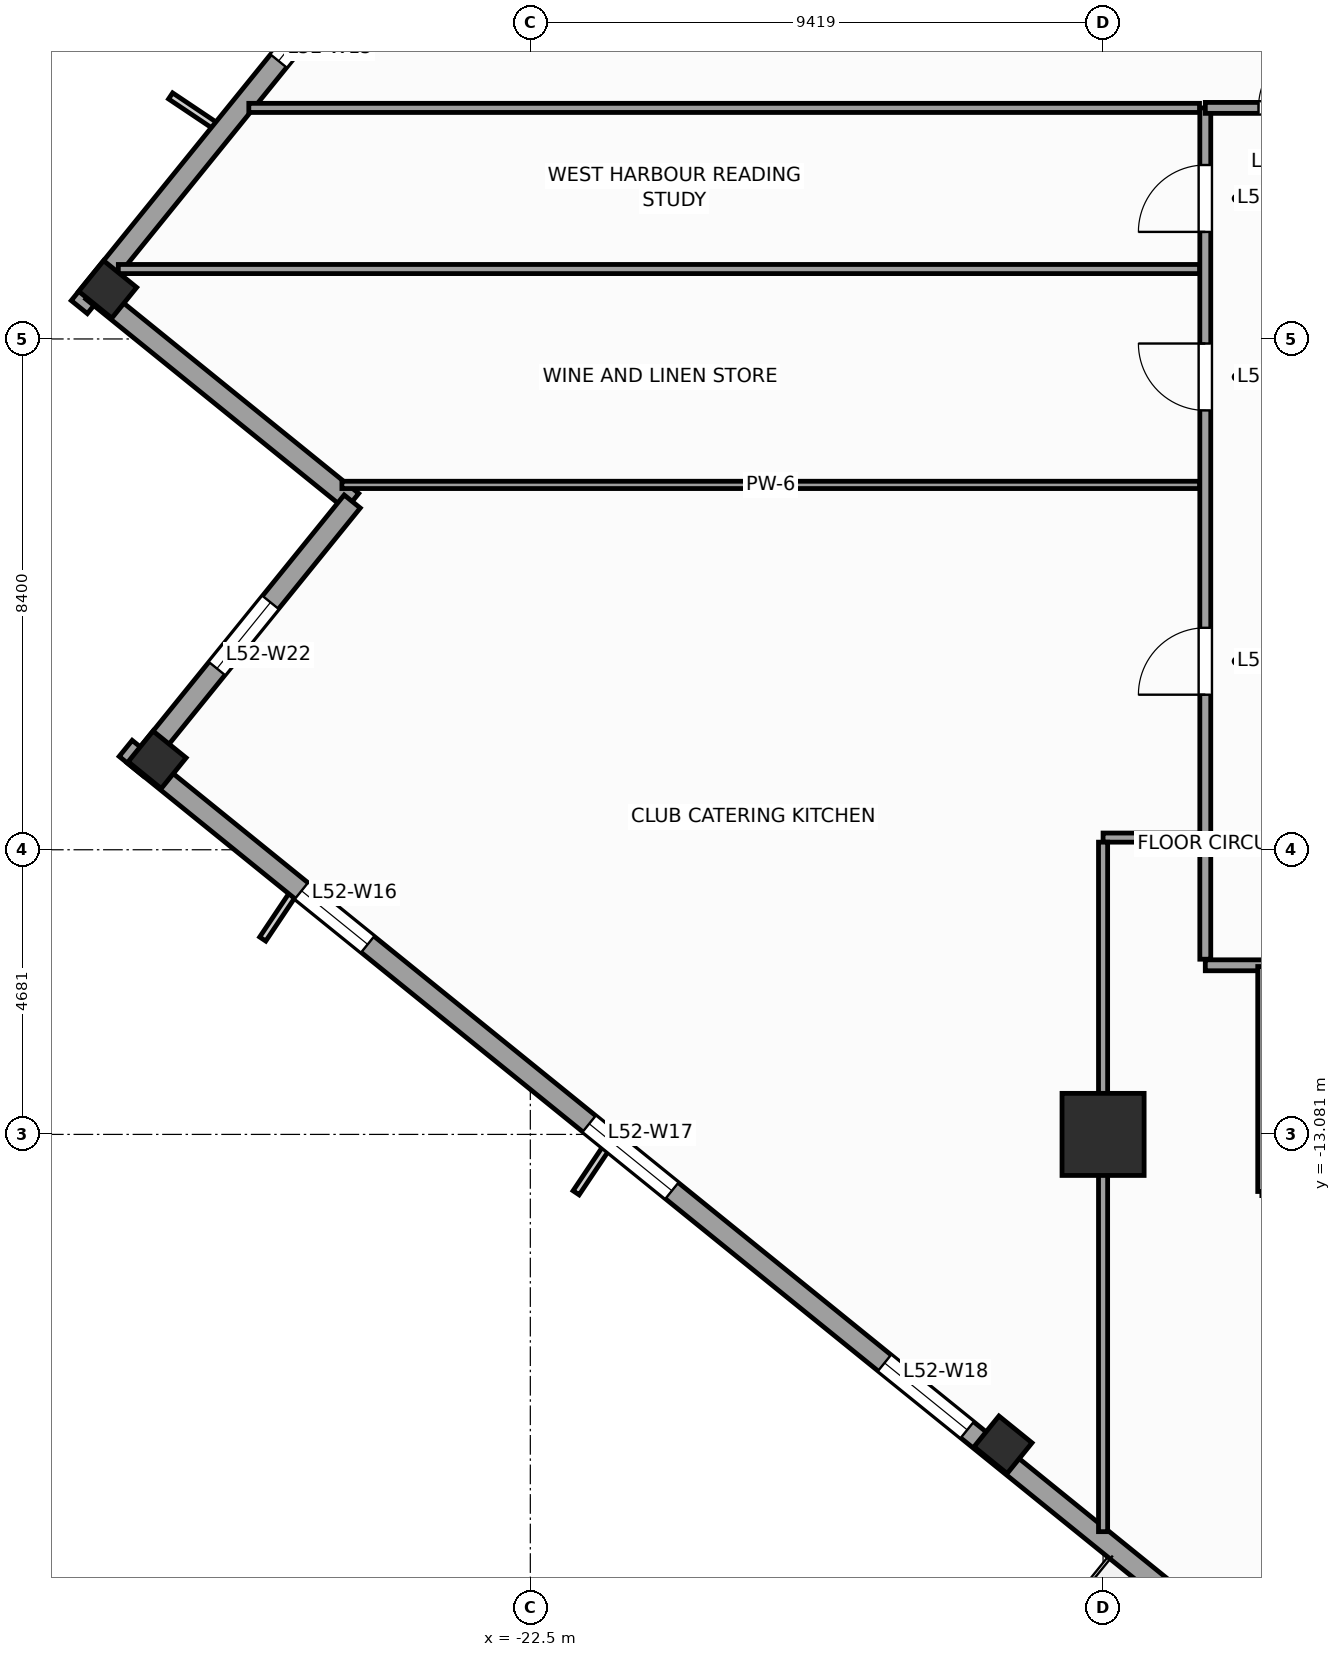
"""IFC4 building model, lengths in metres.
Left out: names, types, materials, properties, quantities, classifications, styles, units other than length and angle.
Written with IfcOpenShell. Run it as: python <this file> out.ifc"""

import sys

from ifc_helpers import new_model, si_unit, direction, frame, frame_2d, origin, origin_2d, place, context, subcontext, project, spatial, rectangle, extrude, source, transform, mapped, element, fill, save


model = new_model("IFC4")
c1 = context("Model", 3, precision=1e-05, world=origin(), true_north=direction((0.0, 1.0)))
c2 = subcontext(c1, "Body", "Model", "MODEL_VIEW")
j1 = project(units=[si_unit("LENGTHUNIT", "METRE"), si_unit("PLANEANGLEUNIT", "RADIAN")], contexts=[c1])
p1 = place(None, origin())
s1 = spatial("IfcSite", under=j1, at=p1, CompositionType="ELEMENT")
p2 = place(p1, origin())
s2 = spatial("IfcBuilding", under=s1, at=p2, CompositionType="ELEMENT")
p3 = place(p2, frame((0.0, 0.0, 217.3)))
s3 = spatial("IfcBuildingStorey", under=s2, at=p3, CompositionType="ELEMENT", Elevation=217.3)
m1 = source(origin(), c2, "Body", "SweptSolid", [
    extrude(rectangle(XDim=1.35, YDim=1.35, at=origin_2d()), origin(), (0.0, 0.0, 1.0), 3.9),
])
p4 = place(p3, frame((-13.081, -13.081, 0.0), z_axis=(0.0, 0.0, 1.0), x_axis=(1.0, 0.0, 0.0)))
e1 = element("IfcColumn", 1, at=p4, inside=s3, PredefinedType="COLUMN", context=c2, shape_type="MappedRepresentation", body=[
    mapped(m1, transform((0.0, 0.0, 0.0), scale=1.0)),
])
m2 = source(origin(), c2, "Body", "SweptSolid", [
    extrude(rectangle(XDim=0.65, YDim=0.7, at=origin_2d()), origin(), (0.0, 0.0, 1.0), 3.9),
])
for number, where, z_axis, x_axis in (
    (2, (-29.45, 0.815, 0.0), (0.0, 0.0, 1.0), (0.629, 0.777, 0.0)),
    (3, (-28.637, -6.92, 0.0), (0.0, 0.0, 1.0), (0.629, 0.777, 0.0)),
    (4, (-14.726, -18.185, 0.0), (0.0, 0.0, 1.0), (0.629, 0.777, 0.0)),
):
    element("IfcColumn", number, at=place(p3, frame(where, z_axis=z_axis, x_axis=x_axis)), inside=s3, PredefinedType="COLUMN", context=c2, shape_type="MappedRepresentation", body=[
        mapped(m2, transform((0.0, 0.0, 0.0), scale=1.0)),
    ])
p5 = place(p3, frame((-6.733, 29.154, 0.0), z_axis=(0.0, 0.0, 1.0), x_axis=(-0.629325378072, -0.77714192302, 0.0)))
e5 = element("IfcWall", 5, at=p5, inside=s3, PredefinedType="STANDARD", context=c2, shape_type="SweptSolid", body=[
    extrude(rectangle(XDim=36.84, YDim=0.34, at=frame_2d((18.42, 0.0))), origin(), (0.0, 0.0, 1.0), 2.96),
])
p6 = place(p5, frame((3.721, 0.0, 0.48)))
e6 = element("IfcOpeningElement", 6, at=p6, cuts=e5, PredefinedType="OPENING", context=c2, shape_type="SweptSolid", body=[
    extrude(rectangle(XDim=1.4, YDim=2.4, at=frame_2d((0.7, 1.2))), frame((0.0, 0.18, 0.0), z_axis=(0.0, -1.0, 0.0), x_axis=(1.0, 0.0, 0.0)), (0.0, 0.0, 1.0), 0.36),
])
p7 = place(p5, frame((9.809, 0.0, 0.58)))
e7 = element("IfcOpeningElement", 7, at=p7, cuts=e5, PredefinedType="OPENING", context=c2, shape_type="SweptSolid", body=[
    extrude(rectangle(XDim=1.75, YDim=2.3, at=frame_2d((0.875, 1.15))), frame((0.0, 0.18, 0.0), z_axis=(0.0, -1.0, 0.0), x_axis=(1.0, 0.0, 0.0)), (0.0, 0.0, 1.0), 0.36),
])
p8 = place(p5, frame((16.058, 0.0, 0.58)))
e8 = element("IfcOpeningElement", 8, at=p8, cuts=e5, PredefinedType="OPENING", context=c2, shape_type="SweptSolid", body=[
    extrude(rectangle(XDim=1.75, YDim=2.3, at=frame_2d((0.875, 1.15))), frame((0.0, 0.18, 0.0), z_axis=(0.0, -1.0, 0.0), x_axis=(1.0, 0.0, 0.0)), (0.0, 0.0, 1.0), 0.36),
])
p9 = place(p5, frame((24.176, 0.0, 0.58)))
e9 = element("IfcOpeningElement", 9, at=p9, cuts=e5, PredefinedType="OPENING", context=c2, shape_type="SweptSolid", body=[
    extrude(rectangle(XDim=1.75, YDim=2.3, at=frame_2d((0.875, 1.15))), frame((0.0, 0.18, 0.0), z_axis=(0.0, -1.0, 0.0), x_axis=(1.0, 0.0, 0.0)), (0.0, 0.0, 1.0), 0.36),
])
p10 = place(p5, frame((30.232, 0.0, 0.48)))
e10 = element("IfcOpeningElement", 10, at=p10, cuts=e5, PredefinedType="OPENING", context=c2, shape_type="SweptSolid", body=[
    extrude(rectangle(XDim=1.4, YDim=2.4, at=frame_2d((0.7, 1.2))), frame((0.0, 0.18, 0.0), z_axis=(0.0, -1.0, 0.0), x_axis=(1.0, 0.0, 0.0)), (0.0, 0.0, 1.0), 0.36),
])
p11 = place(p3, frame((-29.703, 0.789, 0.0), z_axis=(0.0, 0.0, 1.0), x_axis=(0.77714355312, -0.629323365087, 0.0)))
e11 = element("IfcWall", 11, at=p11, inside=s3, PredefinedType="STANDARD", context=c2, shape_type="SweptSolid", body=[
    extrude(rectangle(XDim=5.5, YDim=0.34, at=frame_2d((2.75, 0.0))), origin(), (0.0, 0.0, 1.0), 3.66),
])
p12 = place(p3, frame((-25.429, -2.673, 0.0), z_axis=(0.0, 0.0, 1.0), x_axis=(-0.629299794138, -0.777162640055, 0.0)))
e12 = element("IfcWall", 12, at=p12, inside=s3, PredefinedType="STANDARD", context=c2, shape_type="SweptSolid", body=[
    extrude(rectangle(XDim=5.67, YDim=0.34, at=frame_2d((2.835, 0.0))), origin(), (0.0, 0.0, 1.0), 3.66),
])
p13 = place(p12, frame((2.135, 0.0, 0.48)))
e13 = element("IfcOpeningElement", 13, at=p13, cuts=e12, PredefinedType="OPENING", context=c2, shape_type="SweptSolid", body=[
    extrude(rectangle(XDim=1.4, YDim=2.4, at=frame_2d((0.7, 1.2))), frame((0.0, 0.18, 0.0), z_axis=(0.0, -1.0, 0.0), x_axis=(1.0, 0.0, 0.0)), (0.0, 0.0, 1.0), 0.36),
])
p14 = place(p3, frame((-29.154, -6.733, 0.0), z_axis=(0.0, 0.0, 1.0), x_axis=(0.77714192302, -0.629325378072, 0.0)))
e14 = element("IfcWall", 14, at=p14, inside=s3, PredefinedType="STANDARD", context=c2, shape_type="SweptSolid", body=[
    extrude(rectangle(XDim=36.84, YDim=0.34, at=frame_2d((18.42, 0.0))), origin(), (0.0, 0.0, 1.0), 2.96),
])
p15 = place(p14, frame((23.495, 0.0, 0.0)))
e15 = element("IfcOpeningElement", 15, at=p15, cuts=e14, PredefinedType="OPENING", context=c2, shape_type="SweptSolid", body=[
    extrude(rectangle(XDim=1.05, YDim=2.25, at=frame_2d((0.525, 1.125))), frame((0.0, 0.18, 0.0), z_axis=(0.0, -1.0, 0.0), x_axis=(1.0, 0.0, 0.0)), (0.0, 0.0, 1.0), 0.36),
])
p16 = place(p14, frame((3.721, 0.0, 0.48)))
e16 = element("IfcOpeningElement", 16, at=p16, cuts=e14, PredefinedType="OPENING", context=c2, shape_type="SweptSolid", body=[
    extrude(rectangle(XDim=1.4, YDim=2.4, at=frame_2d((0.7, 1.2))), frame((0.0, 0.18, 0.0), z_axis=(0.0, -1.0, 0.0), x_axis=(1.0, 0.0, 0.0)), (0.0, 0.0, 1.0), 0.36),
])
p17 = place(p14, frame((9.809, 0.0, 0.58)))
e17 = element("IfcOpeningElement", 17, at=p17, cuts=e14, PredefinedType="OPENING", context=c2, shape_type="SweptSolid", body=[
    extrude(rectangle(XDim=1.75, YDim=2.3, at=frame_2d((0.875, 1.15))), frame((0.0, 0.18, 0.0), z_axis=(0.0, -1.0, 0.0), x_axis=(1.0, 0.0, 0.0)), (0.0, 0.0, 1.0), 0.36),
])
p18 = place(p14, frame((16.058, 0.0, 0.58)))
e18 = element("IfcOpeningElement", 18, at=p18, cuts=e14, PredefinedType="OPENING", context=c2, shape_type="SweptSolid", body=[
    extrude(rectangle(XDim=1.75, YDim=2.3, at=frame_2d((0.875, 1.15))), frame((0.0, 0.18, 0.0), z_axis=(0.0, -1.0, 0.0), x_axis=(1.0, 0.0, 0.0)), (0.0, 0.0, 1.0), 0.36),
])
p19 = place(p14, frame((25.676, 0.0, 0.58)))
e19 = element("IfcOpeningElement", 19, at=p19, cuts=e14, PredefinedType="OPENING", context=c2, shape_type="SweptSolid", body=[
    extrude(rectangle(XDim=1.75, YDim=2.3, at=frame_2d((0.875, 1.15))), frame((0.0, 0.18, 0.0), z_axis=(0.0, -1.0, 0.0), x_axis=(1.0, 0.0, 0.0)), (0.0, 0.0, 1.0), 0.36),
])
p20 = place(p14, frame((30.232, 0.0, 0.48)))
e20 = element("IfcOpeningElement", 20, at=p20, cuts=e14, PredefinedType="OPENING", context=c2, shape_type="SweptSolid", body=[
    extrude(rectangle(XDim=1.4, YDim=2.4, at=frame_2d((0.7, 1.2))), frame((0.0, 0.18, 0.0), z_axis=(0.0, -1.0, 0.0), x_axis=(1.0, 0.0, 0.0)), (0.0, 0.0, 1.0), 0.36),
])
p21 = place(p3, frame((-11.4, -10.3, 0.0), z_axis=(0.0, 0.0, 1.0), x_axis=(1.0, 0.0, 0.0)))
e21 = element("IfcWall", 21, at=p21, inside=s3, PredefinedType="PARTITIONING", context=c2, shape_type="SweptSolid", body=[
    extrude(rectangle(XDim=22.75, YDim=0.18, at=frame_2d((11.375, 0.0))), origin(), (0.0, 0.0, 1.0), 3.66),
])
p22 = place(p21, frame((8.436, 0.0, 0.0)))
e22 = element("IfcOpeningElement", 22, at=p22, cuts=e21, PredefinedType="OPENING", context=c2, shape_type="SweptSolid", body=[
    extrude(rectangle(XDim=0.95, YDim=2.1, at=frame_2d((0.475, 1.05))), frame((0.0, 0.1, 0.0), z_axis=(0.0, -1.0, 0.0), x_axis=(1.0, 0.0, 0.0)), (0.0, 0.0, 1.0), 0.2),
])
p23 = place(p21, frame((1.58, 0.0, 0.0)))
e23 = element("IfcOpeningElement", 23, at=p23, cuts=e21, PredefinedType="OPENING", context=c2, shape_type="SweptSolid", body=[
    extrude(rectangle(XDim=0.95, YDim=2.1, at=frame_2d((0.475, 1.05))), frame((0.0, 0.1, 0.0), z_axis=(0.0, -1.0, 0.0), x_axis=(1.0, 0.0, 0.0)), (0.0, 0.0, 1.0), 0.2),
])
p24 = place(p21, frame((4.834, 0.0, 0.0)))
e24 = element("IfcOpeningElement", 24, at=p24, cuts=e21, PredefinedType="OPENING", context=c2, shape_type="SweptSolid", body=[
    extrude(rectangle(XDim=1.1, YDim=2.2, at=frame_2d((0.55, 1.1))), frame((0.0, 0.1, 0.0), z_axis=(0.0, -1.0, 0.0), x_axis=(1.0, 0.0, 0.0)), (0.0, 0.0, 1.0), 0.2),
])
p25 = place(p21, frame((12.0, 0.0, 0.0)))
e25 = element("IfcOpeningElement", 25, at=p25, cuts=e21, PredefinedType="OPENING", context=c2, shape_type="SweptSolid", body=[
    extrude(rectangle(XDim=1.1, YDim=2.2, at=frame_2d((0.55, 1.1))), frame((0.0, 0.1, 0.0), z_axis=(0.0, -1.0, 0.0), x_axis=(1.0, 0.0, 0.0)), (0.0, 0.0, 1.0), 0.2),
])
p26 = place(p21, frame((18.041, 0.0, 0.0)))
e26 = element("IfcOpeningElement", 26, at=p26, cuts=e21, PredefinedType="OPENING", context=c2, shape_type="SweptSolid", body=[
    extrude(rectangle(XDim=1.1, YDim=2.2, at=frame_2d((0.55, 1.1))), frame((0.0, 0.1, 0.0), z_axis=(0.0, -1.0, 0.0), x_axis=(1.0, 0.0, 0.0)), (0.0, 0.0, 1.0), 0.2),
])
p27 = place(p3, frame((-11.4, -10.2, 0.0), z_axis=(0.0, 0.0, 1.0), x_axis=(0.0, 1.0, 0.0)))
e27 = element("IfcWall", 27, at=p27, inside=s3, PredefinedType="PARTITIONING", context=c2, shape_type="SweptSolid", body=[
    extrude(rectangle(XDim=14.0, YDim=0.18, at=frame_2d((7.0, 0.0))), origin(), (0.0, 0.0, 1.0), 3.66),
])
p28 = place(p27, frame((11.96, 0.0, 0.0)))
e28 = element("IfcOpeningElement", 28, at=p28, cuts=e27, PredefinedType="OPENING", context=c2, shape_type="SweptSolid", body=[
    extrude(rectangle(XDim=1.1, YDim=2.2, at=frame_2d((0.55, 1.1))), frame((0.0, 0.1, 0.0), z_axis=(0.0, -1.0, 0.0), x_axis=(1.0, 0.0, 0.0)), (0.0, 0.0, 1.0), 0.2),
])
p29 = place(p27, frame((9.025, 0.0, 0.0)))
e29 = element("IfcOpeningElement", 29, at=p29, cuts=e27, PredefinedType="OPENING", context=c2, shape_type="SweptSolid", body=[
    extrude(rectangle(XDim=1.1, YDim=2.2, at=frame_2d((0.55, 1.1))), frame((0.0, 0.1, 0.0), z_axis=(0.0, -1.0, 0.0), x_axis=(1.0, 0.0, 0.0)), (0.0, 0.0, 1.0), 0.2),
])
p30 = place(p27, frame((4.35, 0.0, 0.0)))
e30 = element("IfcOpeningElement", 30, at=p30, cuts=e27, PredefinedType="OPENING", context=c2, shape_type="SweptSolid", body=[
    extrude(rectangle(XDim=1.1, YDim=2.2, at=frame_2d((0.55, 1.1))), frame((0.0, 0.1, 0.0), z_axis=(0.0, -1.0, 0.0), x_axis=(1.0, 0.0, 0.0)), (0.0, 0.0, 1.0), 0.2),
])
p31 = place(p3, frame((-11.4, 3.8, 0.0), z_axis=(0.0, 0.0, 1.0), x_axis=(1.0, 0.0, 0.0)))
e31 = element("IfcWall", 31, at=p31, inside=s3, PredefinedType="PARTITIONING", context=c2, shape_type="SweptSolid", body=[
    extrude(rectangle(XDim=2.85, YDim=0.18, at=frame_2d((1.425, 0.0))), origin(), (0.0, 0.0, 1.0), 3.66),
])
p32 = place(p31, frame((0.875, 0.0, 0.0)))
e32 = element("IfcOpeningElement", 32, at=p32, cuts=e31, PredefinedType="OPENING", context=c2, shape_type="SweptSolid", body=[
    extrude(rectangle(XDim=1.1, YDim=2.2, at=frame_2d((0.55, 1.1))), frame((0.0, 0.1, 0.0), z_axis=(0.0, -1.0, 0.0), x_axis=(1.0, 0.0, 0.0)), (0.0, 0.0, 1.0), 0.2),
])
p33 = place(p3, frame((-29.275, 1.15, 0.0), z_axis=(0.0, 0.0, 1.0), x_axis=(1.0, 0.0, 0.0)))
e33 = element("IfcWall", 33, at=p33, inside=s3, PredefinedType="PARTITIONING", context=c2, shape_type="SweptSolid", body=[
    extrude(rectangle(XDim=17.78, YDim=0.15, at=frame_2d((8.89, 0.0))), origin(), (0.0, 0.0, 1.0), 3.66),
])
p34 = place(p3, frame((-27.129, 3.8, 0.0), z_axis=(0.0, 0.0, 1.0), x_axis=(1.0, 0.0, 0.0)))
e34 = element("IfcWall", 34, at=p34, inside=s3, PredefinedType="PARTITIONING", context=c2, shape_type="SweptSolid", body=[
    extrude(rectangle(XDim=15.634, YDim=0.15, at=frame_2d((7.817, 0.0))), origin(), (0.0, 0.0, 1.0), 3.66),
])
p35 = place(p3, frame((-11.495, -8.2, 0.0), z_axis=(0.0, 0.0, 1.0), x_axis=(-1.0, 0.0, 0.0)))
e35 = element("IfcWall", 35, at=p35, inside=s3, PredefinedType="PARTITIONING", context=c2, shape_type="SweptSolid", body=[
    extrude(rectangle(XDim=1.586, YDim=0.15, at=frame_2d((0.793, 0.0))), origin(), (0.0, 0.0, 1.0), 3.66),
])
p36 = place(p3, frame((-13.081, -8.275, 0.0), z_axis=(0.0, 0.0, 1.0), x_axis=(0.0, -1.0, 0.0)))
e36 = element("IfcWall", 36, at=p36, inside=s3, PredefinedType="PARTITIONING", context=c2, shape_type="SweptSolid", body=[
    extrude(rectangle(XDim=11.339, YDim=0.15, at=frame_2d((5.669, 0.0))), origin(), (0.0, 0.0, 1.0), 2.76),
])
p37 = place(p3, frame((-25.599, -2.4, 0.0), z_axis=(0.0, 0.0, 1.0), x_axis=(1.0, 0.0, 0.0)))
e37 = element("IfcWall", 37, at=p37, inside=s3, PredefinedType="PARTITIONING", context=c2, shape_type="SweptSolid", body=[
    extrude(rectangle(XDim=14.104, YDim=0.12, at=frame_2d((7.052, 0.0))), origin(), (0.0, 0.0, 1.0), 3.66),
])
p38 = place(p3, frame((-10.47, -14.02, 0.0), z_axis=(0.0, 0.0, 1.0), x_axis=(0.0, 1.0, 0.0)))
e38 = element("IfcWall", 38, at=p38, inside=s3, PredefinedType="PARTITIONING", context=c2, shape_type="SweptSolid", body=[
    extrude(rectangle(XDim=3.7, YDim=0.135, at=frame_2d((1.85, 0.0))), origin(), (0.0, 0.0, 1.0), 3.66),
])
m3 = source(origin(), c2, "Body", "SweptSolid", [
    extrude(rectangle(XDim=1.4, YDim=2.4, at=frame_2d((0.7, 1.2))), frame((0.0, 0.03, 0.0), z_axis=(0.0, -1.0, 0.0), x_axis=(1.0, 0.0, 0.0)), (0.0, 0.0, 1.0), 0.06),
])
p39 = place(p10, origin())
e39 = element("IfcWindow", 39, at=p39, inside=s3, PartitioningType="SINGLE_PANEL", PredefinedType="WINDOW", context=c2, shape_type="MappedRepresentation", body=[
    mapped(m3, transform((0.0, 0.0, 0.0), scale=1.0)),
])
fill(e10, e39)
p40 = place(p16, origin())
e40 = element("IfcWindow", 40, at=p40, inside=s3, PartitioningType="SINGLE_PANEL", PredefinedType="WINDOW", context=c2, shape_type="MappedRepresentation", body=[
    mapped(m3, transform((0.0, 0.0, 0.0), scale=1.0)),
])
fill(e16, e40)
m4 = source(origin(), c2, "Body", "SweptSolid", [
    extrude(rectangle(XDim=1.75, YDim=2.3, at=frame_2d((0.875, 1.15))), frame((0.0, 0.03, 0.0), z_axis=(0.0, -1.0, 0.0), x_axis=(1.0, 0.0, 0.0)), (0.0, 0.0, 1.0), 0.06),
])
p41 = place(p17, origin())
e41 = element("IfcWindow", 41, at=p41, inside=s3, PartitioningType="SINGLE_PANEL", PredefinedType="WINDOW", context=c2, shape_type="MappedRepresentation", body=[
    mapped(m4, transform((0.0, 0.0, 0.0), scale=1.0)),
])
fill(e17, e41)
p42 = place(p18, origin())
e42 = element("IfcWindow", 42, at=p42, inside=s3, PartitioningType="SINGLE_PANEL", PredefinedType="WINDOW", context=c2, shape_type="MappedRepresentation", body=[
    mapped(m4, transform((0.0, 0.0, 0.0), scale=1.0)),
])
fill(e18, e42)
p43 = place(p13, origin())
e43 = element("IfcWindow", 43, at=p43, inside=s3, PartitioningType="SINGLE_PANEL", PredefinedType="WINDOW", context=c2, shape_type="MappedRepresentation", body=[
    mapped(m3, transform((0.0, 0.0, 0.0), scale=1.0)),
])
fill(e13, e43)
m5 = source(origin(), c2, "Body", "SweptSolid", [
    extrude(rectangle(XDim=1.1, YDim=2.2, at=frame_2d((0.55, 1.1))), frame((0.0, 0.025, 0.0), z_axis=(0.0, -1.0, 0.0), x_axis=(1.0, 0.0, 0.0)), (0.0, 0.0, 1.0), 0.05),
])
p44 = place(p28, origin())
e44 = element("IfcDoor", 44, at=p44, inside=s3, OperationType="SINGLE_SWING_LEFT", PredefinedType="DOOR", context=c2, shape_type="MappedRepresentation", body=[
    mapped(m5, transform((0.0, 0.0, 0.0), scale=1.0)),
])
fill(e28, e44)
p45 = place(p32, origin())
e45 = element("IfcDoor", 45, at=p45, inside=s3, OperationType="SINGLE_SWING_RIGHT", PredefinedType="DOOR", context=c2, shape_type="MappedRepresentation", body=[
    mapped(m5, transform((0.0, 0.0, 0.0), scale=1.0)),
])
fill(e32, e45)
p46 = place(p29, origin())
e46 = element("IfcDoor", 46, at=p46, inside=s3, OperationType="SINGLE_SWING_RIGHT", PredefinedType="DOOR", context=c2, shape_type="MappedRepresentation", body=[
    mapped(m5, transform((0.0, 0.0, 0.0), scale=1.0)),
])
fill(e29, e46)
p47 = place(p30, origin())
e47 = element("IfcDoor", 47, at=p47, inside=s3, OperationType="SINGLE_SWING_LEFT", PredefinedType="DOOR", context=c2, shape_type="MappedRepresentation", body=[
    mapped(m5, transform((0.0, 0.0, 0.0), scale=1.0)),
])
fill(e30, e47)
save(model, sys.argv[1])
